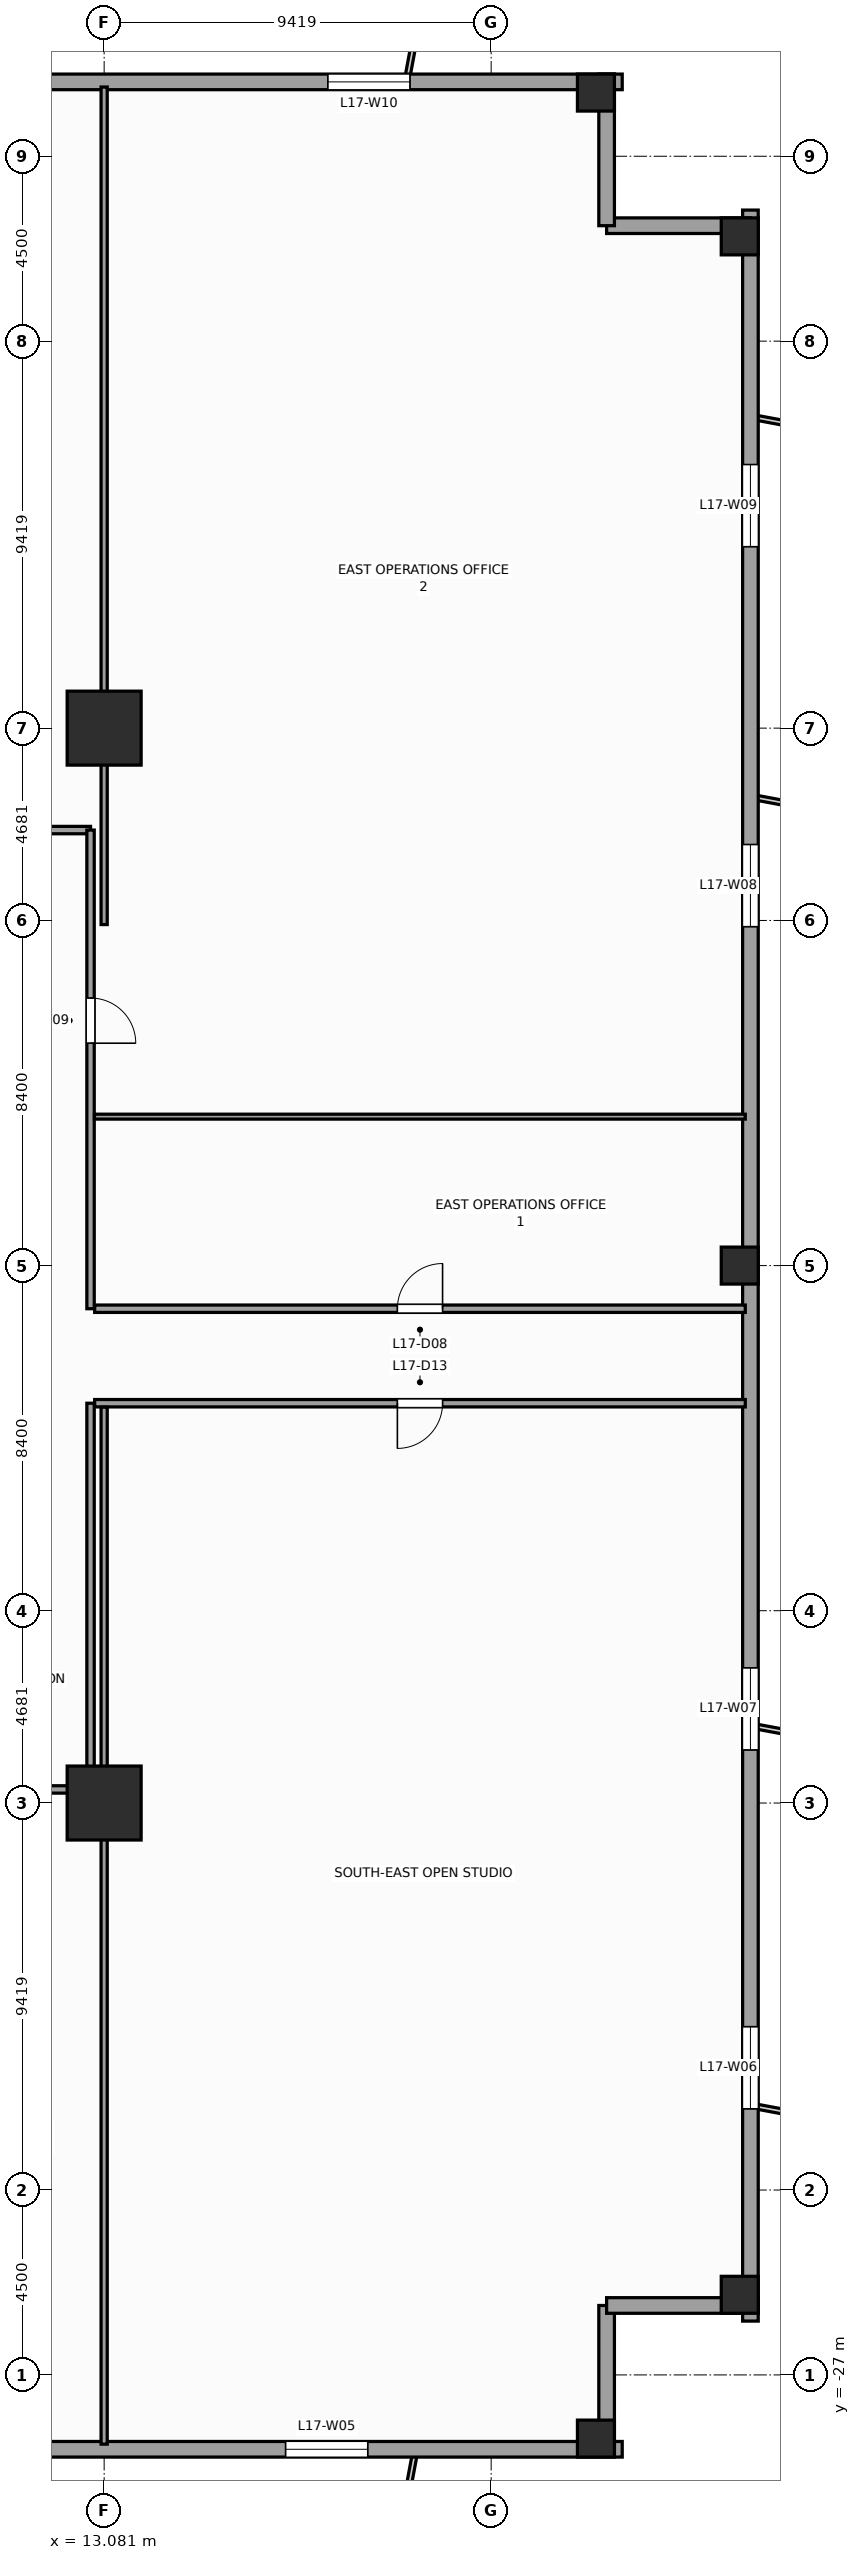
"""IFC4 building model, lengths in metres.
Left out: names, types, materials, properties, quantities, classifications, styles, units other than length and angle.
Written with IfcOpenShell. Run it as: python <this file> out.ifc"""

import sys

from ifc_helpers import new_model, si_unit, direction, frame, frame_2d, origin, origin_2d, place, context, subcontext, project, spatial, rectangle, extrude, source, transform, mapped, element, fill, save


model = new_model("IFC4")
c1 = context("Model", 3, precision=1e-05, world=origin(), true_north=direction((0.0, 1.0)))
c2 = subcontext(c1, "Body", "Model", "MODEL_VIEW")
j1 = project(units=[si_unit("LENGTHUNIT", "METRE"), si_unit("PLANEANGLEUNIT", "RADIAN")], contexts=[c1])
p1 = place(None, origin())
s1 = spatial("IfcSite", under=j1, at=p1, CompositionType="ELEMENT")
p2 = place(p1, origin())
s2 = spatial("IfcBuilding", under=s1, at=p2, CompositionType="ELEMENT")
p3 = place(p2, frame((0.0, 0.0, 74.0)))
s3 = spatial("IfcBuildingStorey", under=s2, at=p3, CompositionType="ELEMENT", Elevation=74.0)
m1 = source(origin(), c2, "Body", "SweptSolid", [
    extrude(rectangle(XDim=1.8, YDim=1.8, at=origin_2d()), origin(), (0.0, 0.0, 1.0), 4.0),
])
for number, where, z_axis, x_axis in (
    (1, (13.081, -13.081, 0.0), (0.0, 0.0, 1.0), (1.0, 0.0, 0.0)),
    (2, (13.081, 13.081, 0.0), (0.0, 0.0, 1.0), (1.0, 0.0, 0.0)),
):
    element("IfcColumn", number, at=place(p3, frame(where, z_axis=z_axis, x_axis=x_axis)), inside=s3, PredefinedType="COLUMN", context=c2, shape_type="MappedRepresentation", body=[
        mapped(m1, transform((0.0, 0.0, 0.0), scale=1.0)),
    ])
m2 = source(origin(), c2, "Body", "SweptSolid", [
    extrude(rectangle(XDim=0.9, YDim=0.9, at=origin_2d()), origin(), (0.0, 0.0, 1.0), 4.0),
])
for number, where, z_axis, x_axis in (
    (3, (25.05, -28.55, 0.0), (0.0, 0.0, 1.0), (1.0, 0.0, 0.0)),
    (4, (28.55, -25.05, 0.0), (0.0, 0.0, 1.0), (1.0, 0.0, 0.0)),
    (5, (28.55, 0.0, 0.0), (0.0, 0.0, 1.0), (1.0, 0.0, 0.0)),
    (6, (28.55, 25.05, 0.0), (0.0, 0.0, 1.0), (1.0, 0.0, 0.0)),
    (7, (25.05, 28.55, 0.0), (0.0, 0.0, 1.0), (1.0, 0.0, 0.0)),
):
    element("IfcColumn", number, at=place(p3, frame(where, z_axis=z_axis, x_axis=x_axis)), inside=s3, PredefinedType="COLUMN", context=c2, shape_type="MappedRepresentation", body=[
        mapped(m2, transform((0.0, 0.0, 0.0), scale=1.0)),
    ])
p4 = place(p3, frame((-25.69, -28.81, 0.0), z_axis=(0.0, 0.0, 1.0), x_axis=(1.0, 0.0, 0.0)))
e8 = element("IfcWall", 8, at=p4, inside=s3, PredefinedType="STANDARD", context=c2, shape_type="SweptSolid", body=[
    extrude(rectangle(XDim=51.38, YDim=0.38, at=frame_2d((25.69, 0.0))), origin(), (0.0, 0.0, 1.0), 2.2),
])
p5 = place(p4, frame((31.615, 0.0, 0.0)))
e9 = element("IfcOpeningElement", 9, at=p5, cuts=e8, PredefinedType="OPENING", context=c2, shape_type="SweptSolid", body=[
    extrude(rectangle(XDim=1.05, YDim=2.02, at=frame_2d((0.525, 1.01))), frame((0.0, 0.2, 0.0), z_axis=(0.0, -1.0, 0.0), x_axis=(1.0, 0.0, 0.0)), (0.0, 0.0, 1.0), 0.4),
])
p6 = place(p4, frame((5.166, 0.0, 0.67)))
e10 = element("IfcOpeningElement", 10, at=p6, cuts=e8, PredefinedType="OPENING", context=c2, shape_type="SweptSolid", body=[
    extrude(rectangle(XDim=2.0, YDim=1.45, at=frame_2d((1.0, 0.725))), frame((0.0, 0.2, 0.0), z_axis=(0.0, -1.0, 0.0), x_axis=(1.0, 0.0, 0.0)), (0.0, 0.0, 1.0), 0.4),
])
p7 = place(p4, frame((13.9, 0.0, 0.67)))
e11 = element("IfcOpeningElement", 11, at=p7, cuts=e8, PredefinedType="OPENING", context=c2, shape_type="SweptSolid", body=[
    extrude(rectangle(XDim=2.0, YDim=1.45, at=frame_2d((1.0, 0.725))), frame((0.0, 0.2, 0.0), z_axis=(0.0, -1.0, 0.0), x_axis=(1.0, 0.0, 0.0)), (0.0, 0.0, 1.0), 0.4),
])
p8 = place(p4, frame((22.912, 0.0, 0.67)))
e12 = element("IfcOpeningElement", 12, at=p8, cuts=e8, PredefinedType="OPENING", context=c2, shape_type="SweptSolid", body=[
    extrude(rectangle(XDim=2.0, YDim=1.45, at=frame_2d((1.0, 0.725))), frame((0.0, 0.2, 0.0), z_axis=(0.0, -1.0, 0.0), x_axis=(1.0, 0.0, 0.0)), (0.0, 0.0, 1.0), 0.4),
])
p9 = place(p4, frame((35.438, 0.0, 0.67)))
e13 = element("IfcOpeningElement", 13, at=p9, cuts=e8, PredefinedType="OPENING", context=c2, shape_type="SweptSolid", body=[
    extrude(rectangle(XDim=2.0, YDim=1.45, at=frame_2d((1.0, 0.725))), frame((0.0, 0.2, 0.0), z_axis=(0.0, -1.0, 0.0), x_axis=(1.0, 0.0, 0.0)), (0.0, 0.0, 1.0), 0.4),
])
p10 = place(p4, frame((43.187, 0.0, 0.67)))
e14 = element("IfcOpeningElement", 14, at=p10, cuts=e8, PredefinedType="OPENING", context=c2, shape_type="SweptSolid", body=[
    extrude(rectangle(XDim=2.0, YDim=1.45, at=frame_2d((1.0, 0.725))), frame((0.0, 0.2, 0.0), z_axis=(0.0, -1.0, 0.0), x_axis=(1.0, 0.0, 0.0)), (0.0, 0.0, 1.0), 0.4),
])
p11 = place(p3, frame((25.31, -28.81, 0.0), z_axis=(0.0, 0.0, 1.0), x_axis=(0.0, 1.0, 0.0)))
e15 = element("IfcWall", 15, at=p11, inside=s3, PredefinedType="STANDARD", context=c2, shape_type="SweptSolid", body=[
    extrude(rectangle(XDim=3.5, YDim=0.38, at=frame_2d((1.75, 0.0))), origin(), (0.0, 0.0, 1.0), 3.6),
])
p12 = place(p3, frame((25.31, -25.31, 0.0), z_axis=(0.0, 0.0, 1.0), x_axis=(1.0, 0.0, 0.0)))
e16 = element("IfcWall", 16, at=p12, inside=s3, PredefinedType="STANDARD", context=c2, shape_type="SweptSolid", body=[
    extrude(rectangle(XDim=3.69, YDim=0.38, at=frame_2d((1.845, 0.0))), origin(), (0.0, 0.0, 1.0), 3.6),
])
p13 = place(p3, frame((28.81, -25.69, 0.0), z_axis=(0.0, 0.0, 1.0), x_axis=(0.0, 1.0, 0.0)))
e17 = element("IfcWall", 17, at=p13, inside=s3, PredefinedType="STANDARD", context=c2, shape_type="SweptSolid", body=[
    extrude(rectangle(XDim=51.38, YDim=0.38, at=frame_2d((25.69, 0.0))), origin(), (0.0, 0.0, 1.0), 2.2),
])
p14 = place(p13, frame((5.166, 0.0, 0.67)))
e18 = element("IfcOpeningElement", 18, at=p14, cuts=e17, PredefinedType="OPENING", context=c2, shape_type="SweptSolid", body=[
    extrude(rectangle(XDim=2.0, YDim=1.45, at=frame_2d((1.0, 0.725))), frame((0.0, 0.2, 0.0), z_axis=(0.0, -1.0, 0.0), x_axis=(1.0, 0.0, 0.0)), (0.0, 0.0, 1.0), 0.4),
])
p15 = place(p13, frame((13.9, 0.0, 0.67)))
e19 = element("IfcOpeningElement", 19, at=p15, cuts=e17, PredefinedType="OPENING", context=c2, shape_type="SweptSolid", body=[
    extrude(rectangle(XDim=2.0, YDim=1.45, at=frame_2d((1.0, 0.725))), frame((0.0, 0.2, 0.0), z_axis=(0.0, -1.0, 0.0), x_axis=(1.0, 0.0, 0.0)), (0.0, 0.0, 1.0), 0.4),
])
p16 = place(p13, frame((33.938, 0.0, 0.67)))
e20 = element("IfcOpeningElement", 20, at=p16, cuts=e17, PredefinedType="OPENING", context=c2, shape_type="SweptSolid", body=[
    extrude(rectangle(XDim=2.0, YDim=1.45, at=frame_2d((1.0, 0.725))), frame((0.0, 0.2, 0.0), z_axis=(0.0, -1.0, 0.0), x_axis=(1.0, 0.0, 0.0)), (0.0, 0.0, 1.0), 0.4),
])
p17 = place(p13, frame((43.187, 0.0, 0.67)))
e21 = element("IfcOpeningElement", 21, at=p17, cuts=e17, PredefinedType="OPENING", context=c2, shape_type="SweptSolid", body=[
    extrude(rectangle(XDim=2.0, YDim=1.45, at=frame_2d((1.0, 0.725))), frame((0.0, 0.2, 0.0), z_axis=(0.0, -1.0, 0.0), x_axis=(1.0, 0.0, 0.0)), (0.0, 0.0, 1.0), 0.4),
])
p18 = place(p3, frame((28.81, 25.31, 0.0), z_axis=(0.0, 0.0, 1.0), x_axis=(-1.0, 0.0, 0.0)))
e22 = element("IfcWall", 22, at=p18, inside=s3, PredefinedType="STANDARD", context=c2, shape_type="SweptSolid", body=[
    extrude(rectangle(XDim=3.5, YDim=0.38, at=frame_2d((1.75, 0.0))), origin(), (0.0, 0.0, 1.0), 3.6),
])
p19 = place(p3, frame((25.31, 25.31, 0.0), z_axis=(0.0, 0.0, 1.0), x_axis=(0.0, 1.0, 0.0)))
e23 = element("IfcWall", 23, at=p19, inside=s3, PredefinedType="STANDARD", context=c2, shape_type="SweptSolid", body=[
    extrude(rectangle(XDim=3.69, YDim=0.38, at=frame_2d((1.845, 0.0))), origin(), (0.0, 0.0, 1.0), 3.6),
])
p20 = place(p3, frame((25.69, 28.81, 0.0), z_axis=(0.0, 0.0, 1.0), x_axis=(-1.0, 0.0, 0.0)))
e24 = element("IfcWall", 24, at=p20, inside=s3, PredefinedType="STANDARD", context=c2, shape_type="SweptSolid", body=[
    extrude(rectangle(XDim=51.38, YDim=0.38, at=frame_2d((25.69, 0.0))), origin(), (0.0, 0.0, 1.0), 2.2),
])
p21 = place(p20, frame((30.765, 0.0, 0.0)))
e25 = element("IfcOpeningElement", 25, at=p21, cuts=e24, PredefinedType="OPENING", context=c2, shape_type="SweptSolid", body=[
    extrude(rectangle(XDim=1.05, YDim=2.02, at=frame_2d((0.525, 1.01))), frame((0.0, 0.2, 0.0), z_axis=(0.0, -1.0, 0.0), x_axis=(1.0, 0.0, 0.0)), (0.0, 0.0, 1.0), 0.4),
])
p22 = place(p20, frame((5.166, 0.0, 0.67)))
e26 = element("IfcOpeningElement", 26, at=p22, cuts=e24, PredefinedType="OPENING", context=c2, shape_type="SweptSolid", body=[
    extrude(rectangle(XDim=2.0, YDim=1.45, at=frame_2d((1.0, 0.725))), frame((0.0, 0.2, 0.0), z_axis=(0.0, -1.0, 0.0), x_axis=(1.0, 0.0, 0.0)), (0.0, 0.0, 1.0), 0.4),
])
p23 = place(p20, frame((13.9, 0.0, 0.67)))
e27 = element("IfcOpeningElement", 27, at=p23, cuts=e24, PredefinedType="OPENING", context=c2, shape_type="SweptSolid", body=[
    extrude(rectangle(XDim=2.0, YDim=1.45, at=frame_2d((1.0, 0.725))), frame((0.0, 0.2, 0.0), z_axis=(0.0, -1.0, 0.0), x_axis=(1.0, 0.0, 0.0)), (0.0, 0.0, 1.0), 0.4),
])
p24 = place(p20, frame((22.912, 0.0, 0.67)))
e28 = element("IfcOpeningElement", 28, at=p24, cuts=e24, PredefinedType="OPENING", context=c2, shape_type="SweptSolid", body=[
    extrude(rectangle(XDim=2.0, YDim=1.45, at=frame_2d((1.0, 0.725))), frame((0.0, 0.2, 0.0), z_axis=(0.0, -1.0, 0.0), x_axis=(1.0, 0.0, 0.0)), (0.0, 0.0, 1.0), 0.4),
])
p25 = place(p20, frame((33.938, 0.0, 0.67)))
e29 = element("IfcOpeningElement", 29, at=p25, cuts=e24, PredefinedType="OPENING", context=c2, shape_type="SweptSolid", body=[
    extrude(rectangle(XDim=2.0, YDim=1.45, at=frame_2d((1.0, 0.725))), frame((0.0, 0.2, 0.0), z_axis=(0.0, -1.0, 0.0), x_axis=(1.0, 0.0, 0.0)), (0.0, 0.0, 1.0), 0.4),
])
p26 = place(p20, frame((43.187, 0.0, 0.67)))
e30 = element("IfcOpeningElement", 30, at=p26, cuts=e24, PredefinedType="OPENING", context=c2, shape_type="SweptSolid", body=[
    extrude(rectangle(XDim=2.0, YDim=1.45, at=frame_2d((1.0, 0.725))), frame((0.0, 0.2, 0.0), z_axis=(0.0, -1.0, 0.0), x_axis=(1.0, 0.0, 0.0)), (0.0, 0.0, 1.0), 0.4),
])
p27 = place(p3, frame((-11.7, 10.6, 0.0), z_axis=(0.0, 0.0, 1.0), x_axis=(1.0, 0.0, 0.0)))
e31 = element("IfcWall", 31, at=p27, inside=s3, PredefinedType="PARTITIONING", context=c2, shape_type="SweptSolid", body=[
    extrude(rectangle(XDim=24.45, YDim=0.18, at=frame_2d((12.225, 0.0))), origin(), (0.0, 0.0, 1.0), 3.6),
])
p28 = place(p27, frame((3.714, 0.0, 0.0)))
e32 = element("IfcOpeningElement", 32, at=p28, cuts=e31, PredefinedType="OPENING", context=c2, shape_type="SweptSolid", body=[
    extrude(rectangle(XDim=1.1, YDim=2.2, at=frame_2d((0.55, 1.1))), frame((0.0, 0.1, 0.0), z_axis=(0.0, -1.0, 0.0), x_axis=(1.0, 0.0, 0.0)), (0.0, 0.0, 1.0), 0.2),
])
p29 = place(p27, frame((11.65, 0.0, 0.0)))
e33 = element("IfcOpeningElement", 33, at=p29, cuts=e31, PredefinedType="OPENING", context=c2, shape_type="SweptSolid", body=[
    extrude(rectangle(XDim=1.1, YDim=2.2, at=frame_2d((0.55, 1.1))), frame((0.0, 0.1, 0.0), z_axis=(0.0, -1.0, 0.0), x_axis=(1.0, 0.0, 0.0)), (0.0, 0.0, 1.0), 0.2),
])
p30 = place(p27, frame((19.611, 0.0, 0.0)))
e34 = element("IfcOpeningElement", 34, at=p30, cuts=e31, PredefinedType="OPENING", context=c2, shape_type="SweptSolid", body=[
    extrude(rectangle(XDim=1.1, YDim=2.2, at=frame_2d((0.55, 1.1))), frame((0.0, 0.1, 0.0), z_axis=(0.0, -1.0, 0.0), x_axis=(1.0, 0.0, 0.0)), (0.0, 0.0, 1.0), 0.2),
])
p31 = place(p3, frame((3.35, -12.75, 0.0), z_axis=(0.0, 0.0, 1.0), x_axis=(1.0, 0.0, 0.0)))
e35 = element("IfcWall", 35, at=p31, inside=s3, PredefinedType="PARTITIONING", context=c2, shape_type="SweptSolid", body=[
    extrude(rectangle(XDim=9.4, YDim=0.18, at=frame_2d((4.7, 0.0))), origin(), (0.0, 0.0, 1.0), 2.2),
])
p32 = place(p31, frame((3.45, 0.0, 0.0)))
e36 = element("IfcOpeningElement", 36, at=p32, cuts=e35, PredefinedType="OPENING", context=c2, shape_type="SweptSolid", body=[
    extrude(rectangle(XDim=1.1, YDim=2.2, at=frame_2d((0.55, 1.1))), frame((0.0, 0.1, 0.0), z_axis=(0.0, -1.0, 0.0), x_axis=(1.0, 0.0, 0.0)), (0.0, 0.0, 1.0), 0.2),
])
p33 = place(p31, frame((6.47, 0.0, 0.0)))
e37 = element("IfcOpeningElement", 37, at=p33, cuts=e35, PredefinedType="OPENING", context=c2, shape_type="SweptSolid", body=[
    extrude(rectangle(XDim=1.1, YDim=2.2, at=frame_2d((0.55, 1.1))), frame((0.0, 0.1, 0.0), z_axis=(0.0, -1.0, 0.0), x_axis=(1.0, 0.0, 0.0)), (0.0, 0.0, 1.0), 0.2),
])
p34 = place(p3, frame((12.75, -12.75, 0.0), z_axis=(0.0, 0.0, 1.0), x_axis=(0.0, 1.0, 0.0)))
e38 = element("IfcWall", 38, at=p34, inside=s3, PredefinedType="PARTITIONING", context=c2, shape_type="SweptSolid", body=[
    extrude(rectangle(XDim=9.4, YDim=0.18, at=frame_2d((4.7, 0.0))), origin(), (0.0, 0.0, 1.0), 2.2),
])
p35 = place(p3, frame((12.75, -1.05, 0.0), z_axis=(0.0, 0.0, 1.0), x_axis=(0.0, 1.0, 0.0)))
e39 = element("IfcWall", 39, at=p35, inside=s3, PredefinedType="PARTITIONING", context=c2, shape_type="SweptSolid", body=[
    extrude(rectangle(XDim=11.65, YDim=0.18, at=frame_2d((5.825, 0.0))), origin(), (0.0, 0.0, 1.0), 2.56),
])
p36 = place(p35, frame((6.462, 0.0, 0.0)))
e40 = element("IfcOpeningElement", 40, at=p36, cuts=e39, PredefinedType="OPENING", context=c2, shape_type="SweptSolid", body=[
    extrude(rectangle(XDim=1.1, YDim=2.2, at=frame_2d((0.55, 1.1))), frame((0.0, 0.1, 0.0), z_axis=(0.0, -1.0, 0.0), x_axis=(1.0, 0.0, 0.0)), (0.0, 0.0, 1.0), 0.2),
])
p37 = place(p3, frame((12.85, -3.35, 0.0), z_axis=(0.0, 0.0, 1.0), x_axis=(1.0, 0.0, 0.0)))
e41 = element("IfcWall", 41, at=p37, inside=s3, PredefinedType="PARTITIONING", context=c2, shape_type="SweptSolid", body=[
    extrude(rectangle(XDim=15.835, YDim=0.18, at=frame_2d((7.917, 0.0))), origin(), (0.0, 0.0, 1.0), 3.6),
])
p38 = place(p37, frame((7.367, 0.0, 0.0)))
e42 = element("IfcOpeningElement", 42, at=p38, cuts=e41, PredefinedType="OPENING", context=c2, shape_type="SweptSolid", body=[
    extrude(rectangle(XDim=1.1, YDim=2.2, at=frame_2d((0.55, 1.1))), frame((0.0, 0.1, 0.0), z_axis=(0.0, -1.0, 0.0), x_axis=(1.0, 0.0, 0.0)), (0.0, 0.0, 1.0), 0.2),
])
p39 = place(p3, frame((12.85, -1.05, 0.0), z_axis=(0.0, 0.0, 1.0), x_axis=(1.0, 0.0, 0.0)))
e43 = element("IfcWall", 43, at=p39, inside=s3, PredefinedType="PARTITIONING", context=c2, shape_type="SweptSolid", body=[
    extrude(rectangle(XDim=15.835, YDim=0.18, at=frame_2d((7.917, 0.0))), origin(), (0.0, 0.0, 1.0), 3.6),
])
p40 = place(p39, frame((7.367, 0.0, 0.0)))
e44 = element("IfcOpeningElement", 44, at=p40, cuts=e43, PredefinedType="OPENING", context=c2, shape_type="SweptSolid", body=[
    extrude(rectangle(XDim=1.1, YDim=2.2, at=frame_2d((0.55, 1.1))), frame((0.0, 0.1, 0.0), z_axis=(0.0, -1.0, 0.0), x_axis=(1.0, 0.0, 0.0)), (0.0, 0.0, 1.0), 0.2),
])
p41 = place(p3, frame((13.081, 8.3, 0.0), z_axis=(0.0, 0.0, 1.0), x_axis=(0.0, 1.0, 0.0)))
e45 = element("IfcWall", 45, at=p41, inside=s3, PredefinedType="PARTITIONING", context=c2, shape_type="SweptSolid", body=[
    extrude(rectangle(XDim=20.385, YDim=0.15, at=frame_2d((10.192, 0.0))), origin(), (0.0, 0.0, 1.0), 2.2),
])
p42 = place(p3, frame((12.845, 3.625, 0.0), z_axis=(0.0, 0.0, 1.0), x_axis=(1.0, 0.0, 0.0)))
e46 = element("IfcWall", 46, at=p42, inside=s3, PredefinedType="PARTITIONING", context=c2, shape_type="SweptSolid", body=[
    extrude(rectangle(XDim=15.84, YDim=0.12, at=frame_2d((7.92, 0.0))), origin(), (0.0, 0.0, 1.0), 3.6),
])
p43 = place(p3, frame((13.081, -28.685, 0.0), z_axis=(0.0, 0.0, 1.0), x_axis=(0.0, 1.0, 0.0)))
e47 = element("IfcWall", 47, at=p43, inside=s3, PredefinedType="PARTITIONING", context=c2, shape_type="SweptSolid", body=[
    extrude(rectangle(XDim=25.24, YDim=0.15, at=frame_2d((12.62, 0.0))), origin(), (0.0, 0.0, 1.0), 2.2),
])
m3 = source(origin(), c2, "Body", "SweptSolid", [
    extrude(rectangle(XDim=2.0, YDim=1.45, at=frame_2d((1.0, 0.725))), frame((0.0, 0.03, 0.0), z_axis=(0.0, -1.0, 0.0), x_axis=(1.0, 0.0, 0.0)), (0.0, 0.0, 1.0), 0.06),
])
p44 = place(p10, origin())
e48 = element("IfcWindow", 48, at=p44, inside=s3, PartitioningType="SINGLE_PANEL", PredefinedType="WINDOW", context=c2, shape_type="MappedRepresentation", body=[
    mapped(m3, transform((0.0, 0.0, 0.0), scale=1.0)),
])
fill(e14, e48)
p45 = place(p14, origin())
e49 = element("IfcWindow", 49, at=p45, inside=s3, PartitioningType="SINGLE_PANEL", PredefinedType="WINDOW", context=c2, shape_type="MappedRepresentation", body=[
    mapped(m3, transform((0.0, 0.0, 0.0), scale=1.0)),
])
fill(e18, e49)
p46 = place(p15, origin())
e50 = element("IfcWindow", 50, at=p46, inside=s3, PartitioningType="SINGLE_PANEL", PredefinedType="WINDOW", context=c2, shape_type="MappedRepresentation", body=[
    mapped(m3, transform((0.0, 0.0, 0.0), scale=1.0)),
])
fill(e19, e50)
p47 = place(p16, origin())
e51 = element("IfcWindow", 51, at=p47, inside=s3, PartitioningType="SINGLE_PANEL", PredefinedType="WINDOW", context=c2, shape_type="MappedRepresentation", body=[
    mapped(m3, transform((0.0, 0.0, 0.0), scale=1.0)),
])
fill(e20, e51)
p48 = place(p17, origin())
e52 = element("IfcWindow", 52, at=p48, inside=s3, PartitioningType="SINGLE_PANEL", PredefinedType="WINDOW", context=c2, shape_type="MappedRepresentation", body=[
    mapped(m3, transform((0.0, 0.0, 0.0), scale=1.0)),
])
fill(e21, e52)
p49 = place(p22, origin())
e53 = element("IfcWindow", 53, at=p49, inside=s3, PartitioningType="SINGLE_PANEL", PredefinedType="WINDOW", context=c2, shape_type="MappedRepresentation", body=[
    mapped(m3, transform((0.0, 0.0, 0.0), scale=1.0)),
])
fill(e26, e53)
m4 = source(origin(), c2, "Body", "SweptSolid", [
    extrude(rectangle(XDim=1.1, YDim=2.2, at=frame_2d((0.55, 1.1))), frame((0.0, 0.025, 0.0), z_axis=(0.0, -1.0, 0.0), x_axis=(1.0, 0.0, 0.0)), (0.0, 0.0, 1.0), 0.05),
])
p50 = place(p40, origin())
e54 = element("IfcDoor", 54, at=p50, inside=s3, OperationType="SINGLE_SWING_RIGHT", PredefinedType="DOOR", context=c2, shape_type="MappedRepresentation", body=[
    mapped(m4, transform((0.0, 0.0, 0.0), scale=1.0)),
])
fill(e44, e54)
p51 = place(p36, frame((1.1, 0.0, 0.0), z_axis=(0.0, 0.0, 1.0), x_axis=(-1.0, 0.0, 0.0)))
e55 = element("IfcDoor", 55, at=p51, inside=s3, OperationType="SINGLE_SWING_LEFT", PredefinedType="DOOR", context=c2, shape_type="MappedRepresentation", body=[
    mapped(m4, transform((0.0, 0.0, 0.0), scale=1.0)),
])
fill(e40, e55)
p52 = place(p38, frame((1.1, 0.0, 0.0), z_axis=(0.0, 0.0, 1.0), x_axis=(-1.0, 0.0, 0.0)))
e56 = element("IfcDoor", 56, at=p52, inside=s3, OperationType="SINGLE_SWING_LEFT", PredefinedType="DOOR", context=c2, shape_type="MappedRepresentation", body=[
    mapped(m4, transform((0.0, 0.0, 0.0), scale=1.0)),
])
fill(e42, e56)
save(model, sys.argv[1])
